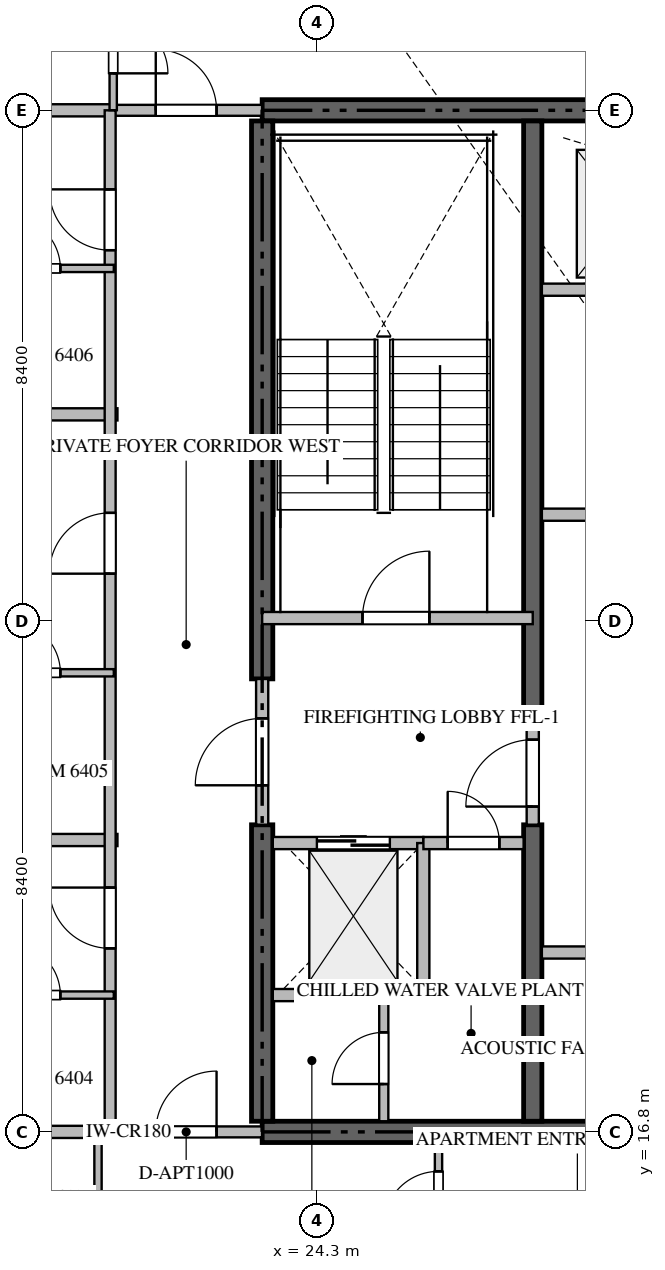
"""IFC4 building model, lengths in metres.
Left out: names, types, materials, properties, quantities, classifications, styles, units other than length and angle.
Written with IfcOpenShell. Run it as: python <this file> out.ifc"""

import sys

from ifc_helpers import new_model, si_unit, direction, frame, frame_2d, origin, place, context, subcontext, project, spatial, rectangle, extrude, source, transform, mapped, element, fill, save


model = new_model("IFC4")
c1 = context("Model", 3, precision=1e-05, world=origin(), true_north=direction((0.0, 1.0)))
c2 = subcontext(c1, "Body", "Model", "MODEL_VIEW")
j1 = project(units=[si_unit("LENGTHUNIT", "METRE"), si_unit("PLANEANGLEUNIT", "RADIAN")], contexts=[c1])
p1 = place(None, origin())
s1 = spatial("IfcSite", under=j1, at=p1, CompositionType="ELEMENT")
p2 = place(p1, origin())
s2 = spatial("IfcBuilding", under=s1, at=p2, CompositionType="ELEMENT")
p3 = place(p2, frame((0.0, 0.0, 256.65)))
s3 = spatial("IfcBuildingStorey", under=s2, at=p3, CompositionType="ELEMENT", Elevation=256.65)
for number, where, z_axis, x_axis in (
    (1, (23.4, 16.8, -0.26), (0.0, 0.0, 1.0), (1.0, 0.0, 0.0)),
    (2, (41.4, 33.6, -0.26), (0.0, 0.0, 1.0), (-1.0, 0.0, 0.0)),
):
    element("IfcWall", number, at=place(p3, frame(where, z_axis=z_axis, x_axis=x_axis)), inside=s3, PredefinedType="SHEAR", context=c2, shape_type="SweptSolid", body=[
        extrude(rectangle(XDim=18.0, YDim=0.35, at=frame_2d((9.0, 0.0))), origin(), (0.0, 0.0, 1.0), 3.848),
    ])
p4 = place(p3, frame((23.4, 16.975, -0.26), z_axis=(0.0, 0.0, 1.0), x_axis=(0.0, 1.0, 0.0)))
e3 = element("IfcWall", 3, at=p4, inside=s3, PredefinedType="SHEAR", context=c2, shape_type="SweptSolid", body=[
    extrude(rectangle(XDim=4.875, YDim=0.35, at=frame_2d((2.438, 0.0))), origin(), (0.0, 0.0, 1.0), 3.848),
])
p5 = place(p3, frame((23.4, 24.25, -0.26), z_axis=(0.0, 0.0, 1.0), x_axis=(0.0, 1.0, 0.0)))
e4 = element("IfcWall", 4, at=p5, inside=s3, PredefinedType="SHEAR", context=c2, shape_type="SweptSolid", body=[
    extrude(rectangle(XDim=9.175, YDim=0.35, at=frame_2d((4.587, 0.0))), origin(), (0.0, 0.0, 1.0), 3.848),
])
p6 = place(p3, frame((27.85, 16.975, -0.26), z_axis=(0.0, 0.0, 1.0), x_axis=(0.0, 1.0, 0.0)))
e5 = element("IfcWall", 5, at=p6, inside=s3, PredefinedType="SHEAR", context=c2, shape_type="SweptSolid", body=[
    extrude(rectangle(XDim=4.875, YDim=0.3, at=frame_2d((2.438, 0.0))), origin(), (0.0, 0.0, 1.0), 3.848),
])
p7 = place(p3, frame((27.85, 23.55, -0.26), z_axis=(0.0, 0.0, 1.0), x_axis=(0.0, 1.0, 0.0)))
e6 = element("IfcWall", 6, at=p7, inside=s3, PredefinedType="SHEAR", context=c2, shape_type="SweptSolid", body=[
    extrude(rectangle(XDim=9.875, YDim=0.3, at=frame_2d((4.938, 0.0))), origin(), (0.0, 0.0, 1.0), 3.848),
])
p8 = place(p3, frame((23.4, 25.25, 0.0), z_axis=(0.0, 0.0, 1.0), x_axis=(1.0, 0.0, 0.0)))
e7 = element("IfcWall", 7, at=p8, inside=s3, PredefinedType="STANDARD", context=c2, shape_type="SweptSolid", body=[
    extrude(rectangle(XDim=4.45, YDim=0.2, at=frame_2d((2.225, 0.0))), origin(), (0.0, 0.0, 1.0), 3.59),
])
p9 = place(p8, frame((1.65, 0.0, 0.0)))
e8 = element("IfcOpeningElement", 8, at=p9, cuts=e7, PredefinedType="OPENING", context=c2, shape_type="SweptSolid", body=[
    extrude(rectangle(XDim=1.1, YDim=2.15, at=frame_2d((0.55, 1.075))), frame((0.0, 0.11, 0.0), z_axis=(0.0, -1.0, 0.0), x_axis=(1.0, 0.0, 0.0)), (0.0, 0.0, 1.0), 0.22),
])
p10 = place(p3, frame((23.575, 21.55, 0.0), z_axis=(0.0, 0.0, 1.0), x_axis=(1.0, 0.0, 0.0)))
e9 = element("IfcWall", 9, at=p10, inside=s3, PredefinedType="STANDARD", context=c2, shape_type="SweptSolid", body=[
    extrude(rectangle(XDim=2.475, YDim=0.2, at=frame_2d((1.238, 0.0))), origin(), (0.0, 0.0, 1.0), 3.59),
])
p11 = place(p10, frame((0.725, 0.0, 0.0)))
e10 = element("IfcOpeningElement", 10, at=p11, cuts=e9, PredefinedType="OPENING", context=c2, shape_type="SweptSolid", body=[
    extrude(rectangle(XDim=1.2, YDim=2.2, at=frame_2d((0.6, 1.1))), frame((0.0, 0.11, 0.0), z_axis=(0.0, -1.0, 0.0), x_axis=(1.0, 0.0, 0.0)), (0.0, 0.0, 1.0), 0.22),
])
p12 = place(p3, frame((28.0, 30.65, 0.0), z_axis=(0.0, 0.0, 1.0), x_axis=(1.0, 0.0, 0.0)))
e11 = element("IfcWall", 11, at=p12, inside=s3, PredefinedType="STANDARD", context=c2, shape_type="SweptSolid", body=[
    extrude(rectangle(XDim=2.55, YDim=0.2, at=frame_2d((1.275, 0.0))), origin(), (0.0, 0.0, 1.0), 3.59),
])
p13 = place(p12, frame((0.85, 0.0, 0.0)))
e12 = element("IfcOpeningElement", 12, at=p13, cuts=e11, PredefinedType="OPENING", context=c2, shape_type="SweptSolid", body=[
    extrude(rectangle(XDim=1.1, YDim=2.2, at=frame_2d((0.55, 1.1))), frame((0.0, 0.11, 0.0), z_axis=(0.0, -1.0, 0.0), x_axis=(1.0, 0.0, 0.0)), (0.0, 0.0, 1.0), 0.22),
])
p14 = place(p3, frame((26.05, 19.05, 0.0), z_axis=(0.0, 0.0, 1.0), x_axis=(0.0, 1.0, 0.0)))
e13 = element("IfcWall", 13, at=p14, inside=s3, PredefinedType="STANDARD", context=c2, shape_type="SweptSolid", body=[
    extrude(rectangle(XDim=2.5, YDim=0.2, at=frame_2d((1.25, 0.0))), origin(), (0.0, 0.0, 1.0), 3.59),
])
p15 = place(p3, frame((23.575, 19.05, 0.0), z_axis=(0.0, 0.0, 1.0), x_axis=(1.0, 0.0, 0.0)))
e14 = element("IfcWall", 14, at=p15, inside=s3, PredefinedType="STANDARD", context=c2, shape_type="SweptSolid", body=[
    extrude(rectangle(XDim=2.475, YDim=0.2, at=frame_2d((1.238, 0.0))), origin(), (0.0, 0.0, 1.0), 3.59),
])
p16 = place(p3, frame((26.052, 21.55, 0.0), z_axis=(0.0, 0.0, 1.0), x_axis=(1.0, 0.0, 0.0)))
e15 = element("IfcWall", 15, at=p16, inside=s3, PredefinedType="STANDARD", context=c2, shape_type="SweptSolid", body=[
    extrude(rectangle(XDim=1.648, YDim=0.2, at=frame_2d((0.824, 0.0))), origin(), (0.0, 0.0, 1.0), 3.59),
])
p17 = place(p16, frame((0.399, 0.0, 0.0)))
e16 = element("IfcOpeningElement", 16, at=p17, cuts=e15, PredefinedType="OPENING", context=c2, shape_type="SweptSolid", body=[
    extrude(rectangle(XDim=0.85, YDim=2.1, at=frame_2d((0.425, 1.05))), frame((0.0, 0.11, 0.0), z_axis=(0.0, -1.0, 0.0), x_axis=(1.0, 0.0, 0.0)), (0.0, 0.0, 1.0), 0.22),
])
p18 = place(p3, frame((23.4, 21.852, 0.0), z_axis=(0.0, 0.0, 1.0), x_axis=(0.0, 1.0, 0.0)))
e17 = element("IfcWall", 17, at=p18, inside=s3, PredefinedType="STANDARD", context=c2, shape_type="SweptSolid", body=[
    extrude(rectangle(XDim=2.396, YDim=0.2, at=frame_2d((1.198, 0.0))), origin(), (0.0, 0.0, 1.0), 3.59),
])
p19 = place(p18, frame((0.648, 0.0, 0.0)))
e18 = element("IfcOpeningElement", 18, at=p19, cuts=e17, PredefinedType="OPENING", context=c2, shape_type="SweptSolid", body=[
    extrude(rectangle(XDim=1.1, YDim=2.15, at=frame_2d((0.55, 1.075))), frame((0.0, 0.11, 0.0), z_axis=(0.0, -1.0, 0.0), x_axis=(1.0, 0.0, 0.0)), (0.0, 0.0, 1.0), 0.22),
])
p20 = place(p3, frame((27.85, 21.852, 0.0), z_axis=(0.0, 0.0, 1.0), x_axis=(0.0, 1.0, 0.0)))
e19 = element("IfcWall", 19, at=p20, inside=s3, PredefinedType="STANDARD", context=c2, shape_type="SweptSolid", body=[
    extrude(rectangle(XDim=1.696, YDim=0.2, at=frame_2d((0.848, 0.0))), origin(), (0.0, 0.0, 1.0), 3.59),
])
p21 = place(p20, frame((0.298, 0.0, 0.0)))
e20 = element("IfcOpeningElement", 20, at=p21, cuts=e19, PredefinedType="OPENING", context=c2, shape_type="SweptSolid", body=[
    extrude(rectangle(XDim=1.1, YDim=2.15, at=frame_2d((0.55, 1.075))), frame((0.0, 0.11, 0.0), z_axis=(0.0, -1.0, 0.0), x_axis=(1.0, 0.0, 0.0)), (0.0, 0.0, 1.0), 0.22),
])
p22 = place(p3, frame((25.4, 16.975, 0.0), z_axis=(0.0, 0.0, 1.0), x_axis=(0.0, 1.0, 0.0)))
e21 = element("IfcWall", 21, at=p22, inside=s3, PredefinedType="PARTITIONING", context=c2, shape_type="SweptSolid", body=[
    extrude(rectangle(XDim=2.075, YDim=0.15, at=frame_2d((1.038, 0.0))), origin(), (0.0, 0.0, 1.0), 3.59),
])
p23 = place(p22, frame((0.612, 0.0, 0.0)))
e22 = element("IfcOpeningElement", 22, at=p23, cuts=e21, PredefinedType="OPENING", context=c2, shape_type="SweptSolid", body=[
    extrude(rectangle(XDim=0.85, YDim=2.1, at=frame_2d((0.425, 1.05))), frame((0.0, 0.085, 0.0), z_axis=(0.0, -1.0, 0.0), x_axis=(1.0, 0.0, 0.0)), (0.0, 0.0, 1.0), 0.17),
])
p24 = place(p3, frame((28.0, 19.75, 0.0), z_axis=(0.0, 0.0, 1.0), x_axis=(1.0, 0.0, 0.0)))
e23 = element("IfcWall", 23, at=p24, inside=s3, PredefinedType="STANDARD", context=c2, shape_type="SweptSolid", body=[
    extrude(rectangle(XDim=4.4, YDim=0.2, at=frame_2d((2.2, 0.0))), origin(), (0.0, 0.0, 1.0), 3.59),
])
p25 = place(p24, frame((1.75, 0.0, 0.0)))
e24 = element("IfcOpeningElement", 24, at=p25, cuts=e23, PredefinedType="OPENING", context=c2, shape_type="SweptSolid", body=[
    extrude(rectangle(XDim=0.9, YDim=2.1, at=frame_2d((0.45, 1.05))), frame((0.0, 0.11, 0.0), z_axis=(0.0, -1.0, 0.0), x_axis=(1.0, 0.0, 0.0)), (0.0, 0.0, 1.0), 0.22),
])
p26 = place(p3, frame((28.0, 26.95, 0.0), z_axis=(0.0, 0.0, 1.0), x_axis=(1.0, 0.0, 0.0)))
e25 = element("IfcWall", 25, at=p26, inside=s3, PredefinedType="STANDARD", context=c2, shape_type="SweptSolid", body=[
    extrude(rectangle(XDim=6.95, YDim=0.2, at=frame_2d((3.475, 0.0))), origin(), (0.0, 0.0, 1.0), 3.59),
])
for number, where, z_axis, x_axis in (
    (26, (7.482, 21.6, 0.0), (0.0, 0.0, 1.0), (1.0, 0.0, 0.0)),
    (27, (7.482, 28.6, 0.0), (0.0, 0.0, 1.0), (1.0, 0.0, 0.0)),
):
    element("IfcWall", number, at=place(p3, frame(where, z_axis=z_axis, x_axis=x_axis)), inside=s3, PredefinedType="PARTITIONING", context=c2, shape_type="SweptSolid", body=[
        extrude(rectangle(XDim=13.538, YDim=0.2, at=frame_2d((6.769, 0.0))), origin(), (0.0, 0.0, 1.0), 3.59),
    ])
for number, where, z_axis, x_axis in (
    (28, (7.482, 16.8, 0.0), (0.0, 0.0, 1.0), (1.0, 0.0, 0.0)),
    (29, (7.482, 33.6, 0.0), (0.0, 0.0, 1.0), (1.0, 0.0, 0.0)),
):
    element("IfcWall", number, at=place(p3, frame(where, z_axis=z_axis, x_axis=x_axis)), inside=s3, PredefinedType="PARTITIONING", context=c2, shape_type="SweptSolid", body=[
        extrude(rectangle(XDim=13.418, YDim=0.2, at=frame_2d((6.709, 0.0))), origin(), (0.0, 0.0, 1.0), 3.59),
    ])
p27 = place(p3, frame((20.902, 16.8, 0.0), z_axis=(0.0, 0.0, 1.0), x_axis=(1.0, 0.0, 0.0)))
e30 = element("IfcWall", 30, at=p27, inside=s3, PredefinedType="PARTITIONING", context=c2, shape_type="SweptSolid", body=[
    extrude(rectangle(XDim=2.496, YDim=0.18, at=frame_2d((1.248, 0.0))), origin(), (0.0, 0.0, 1.0), 3.59),
])
p28 = place(p27, frame((0.748, 0.0, 0.0)))
e31 = element("IfcOpeningElement", 31, at=p28, cuts=e30, PredefinedType="OPENING", context=c2, shape_type="SweptSolid", body=[
    extrude(rectangle(XDim=1.0, YDim=2.15, at=frame_2d((0.5, 1.075))), frame((0.0, 0.1, 0.0), z_axis=(0.0, -1.0, 0.0), x_axis=(1.0, 0.0, 0.0)), (0.0, 0.0, 1.0), 0.2),
])
p29 = place(p3, frame((20.902, 33.6, 0.0), z_axis=(0.0, 0.0, 1.0), x_axis=(1.0, 0.0, 0.0)))
e32 = element("IfcWall", 32, at=p29, inside=s3, PredefinedType="PARTITIONING", context=c2, shape_type="SweptSolid", body=[
    extrude(rectangle(XDim=2.496, YDim=0.18, at=frame_2d((1.248, 0.0))), origin(), (0.0, 0.0, 1.0), 3.59),
])
p30 = place(p29, frame((0.748, 0.0, 0.0)))
e33 = element("IfcOpeningElement", 33, at=p30, cuts=e32, PredefinedType="OPENING", context=c2, shape_type="SweptSolid", body=[
    extrude(rectangle(XDim=1.0, YDim=2.15, at=frame_2d((0.5, 1.075))), frame((0.0, 0.1, 0.0), z_axis=(0.0, -1.0, 0.0), x_axis=(1.0, 0.0, 0.0)), (0.0, 0.0, 1.0), 0.2),
])
p31 = place(p3, frame((20.9, 16.8, 0.0), z_axis=(0.0, 0.0, 1.0), x_axis=(0.0, 1.0, 0.0)))
e34 = element("IfcWall", 34, at=p31, inside=s3, PredefinedType="PARTITIONING", context=c2, shape_type="SweptSolid", body=[
    extrude(rectangle(XDim=16.8, YDim=0.18, at=frame_2d((8.4, 0.0))), origin(), (0.0, 0.0, 1.0), 3.59),
])
p32 = place(p31, frame((3.018, 0.0, 0.0)))
e35 = element("IfcOpeningElement", 35, at=p32, cuts=e34, PredefinedType="OPENING", context=c2, shape_type="SweptSolid", body=[
    extrude(rectangle(XDim=1.0, YDim=2.15, at=frame_2d((0.5, 1.075))), frame((0.0, 0.1, 0.0), z_axis=(0.0, -1.0, 0.0), x_axis=(1.0, 0.0, 0.0)), (0.0, 0.0, 1.0), 0.2),
])
p33 = place(p31, frame((9.18, 0.0, 0.0)))
e36 = element("IfcOpeningElement", 36, at=p33, cuts=e34, PredefinedType="OPENING", context=c2, shape_type="SweptSolid", body=[
    extrude(rectangle(XDim=1.0, YDim=2.15, at=frame_2d((0.5, 1.075))), frame((0.0, 0.1, 0.0), z_axis=(0.0, -1.0, 0.0), x_axis=(1.0, 0.0, 0.0)), (0.0, 0.0, 1.0), 0.2),
])
p34 = place(p31, frame((14.5, 0.0, 0.0)))
e37 = element("IfcOpeningElement", 37, at=p34, cuts=e34, PredefinedType="OPENING", context=c2, shape_type="SweptSolid", body=[
    extrude(rectangle(XDim=1.0, YDim=2.15, at=frame_2d((0.5, 1.075))), frame((0.0, 0.1, 0.0), z_axis=(0.0, -1.0, 0.0), x_axis=(1.0, 0.0, 0.0)), (0.0, 0.0, 1.0), 0.2),
])
p35 = place(p3, frame((20.7, 14.05, 0.0), z_axis=(0.0, 0.0, 1.0), x_axis=(0.0, 1.0, 0.0)))
e38 = element("IfcWall", 38, at=p35, inside=s3, PredefinedType="PARTITIONING", context=c2, shape_type="SweptSolid", body=[
    extrude(rectangle(XDim=2.81, YDim=0.12, at=frame_2d((1.405, 0.0))), origin(), (0.0, 0.0, 1.0), 3.59),
])
p36 = place(p3, frame((26.3, 14.65, 0.0), z_axis=(0.0, 0.0, 1.0), x_axis=(0.0, 1.0, 0.0)))
e39 = element("IfcWall", 39, at=p36, inside=s3, PredefinedType="PARTITIONING", context=c2, shape_type="SweptSolid", body=[
    extrude(rectangle(XDim=1.975, YDim=0.12, at=frame_2d((0.988, 0.0))), origin(), (0.0, 0.0, 1.0), 3.59),
])
p37 = place(p36, frame((0.601, 0.0, 0.0)))
e40 = element("IfcOpeningElement", 40, at=p37, cuts=e39, PredefinedType="OPENING", context=c2, shape_type="SweptSolid", body=[
    extrude(rectangle(XDim=0.9, YDim=2.1, at=frame_2d((0.45, 1.05))), frame((0.0, 0.07, 0.0), z_axis=(0.0, -1.0, 0.0), x_axis=(1.0, 0.0, 0.0)), (0.0, 0.0, 1.0), 0.14),
])
p38 = place(p3, frame((20.95, 35.75, 0.0), z_axis=(0.0, 0.0, 1.0), x_axis=(0.0, -1.0, 0.0)))
e41 = element("IfcWall", 41, at=p38, inside=s3, PredefinedType="PARTITIONING", context=c2, shape_type="SweptSolid", body=[
    extrude(rectangle(XDim=2.148, YDim=0.12, at=frame_2d((1.074, 0.0))), origin(), (0.0, 0.0, 1.0), 3.59),
])
p39 = place(p38, frame((0.642, 0.0, 0.0)))
e42 = element("IfcOpeningElement", 42, at=p39, cuts=e41, PredefinedType="OPENING", context=c2, shape_type="SweptSolid", body=[
    extrude(rectangle(XDim=0.9, YDim=2.1, at=frame_2d((0.45, 1.05))), frame((0.0, 0.07, 0.0), z_axis=(0.0, -1.0, 0.0), x_axis=(1.0, 0.0, 0.0)), (0.0, 0.0, 1.0), 0.14),
])
p40 = place(p3, frame((18.352, 19.05, 0.0), z_axis=(0.0, 0.0, 1.0), x_axis=(1.0, 0.0, 0.0)))
e43 = element("IfcWall", 43, at=p40, inside=s3, PredefinedType="PARTITIONING", context=c2, shape_type="SweptSolid", body=[
    extrude(rectangle(XDim=2.608, YDim=0.12, at=frame_2d((1.304, 0.0))), origin(), (0.0, 0.0, 1.0), 3.59),
])
p41 = place(p40, frame((0.879, 0.0, 0.0)))
e44 = element("IfcOpeningElement", 44, at=p41, cuts=e43, PredefinedType="OPENING", context=c2, shape_type="SweptSolid", body=[
    extrude(rectangle(XDim=0.85, YDim=2.1, at=frame_2d((0.425, 1.05))), frame((0.0, 0.07, 0.0), z_axis=(0.0, -1.0, 0.0), x_axis=(1.0, 0.0, 0.0)), (0.0, 0.0, 1.0), 0.14),
])
p42 = place(p3, frame((18.352, 24.35, 0.0), z_axis=(0.0, 0.0, 1.0), x_axis=(1.0, 0.0, 0.0)))
e45 = element("IfcWall", 45, at=p42, inside=s3, PredefinedType="PARTITIONING", context=c2, shape_type="SweptSolid", body=[
    extrude(rectangle(XDim=2.608, YDim=0.12, at=frame_2d((1.304, 0.0))), origin(), (0.0, 0.0, 1.0), 3.59),
])
p43 = place(p42, frame((0.879, 0.0, 0.0)))
e46 = element("IfcOpeningElement", 46, at=p43, cuts=e45, PredefinedType="OPENING", context=c2, shape_type="SweptSolid", body=[
    extrude(rectangle(XDim=0.85, YDim=2.1, at=frame_2d((0.425, 1.05))), frame((0.0, 0.07, 0.0), z_axis=(0.0, -1.0, 0.0), x_axis=(1.0, 0.0, 0.0)), (0.0, 0.0, 1.0), 0.14),
])
p44 = place(p3, frame((18.352, 31.0, 0.0), z_axis=(0.0, 0.0, 1.0), x_axis=(1.0, 0.0, 0.0)))
e47 = element("IfcWall", 47, at=p44, inside=s3, PredefinedType="PARTITIONING", context=c2, shape_type="SweptSolid", body=[
    extrude(rectangle(XDim=2.608, YDim=0.12, at=frame_2d((1.304, 0.0))), origin(), (0.0, 0.0, 1.0), 3.59),
])
p45 = place(p44, frame((0.879, 0.0, 0.0)))
e48 = element("IfcOpeningElement", 48, at=p45, cuts=e47, PredefinedType="OPENING", context=c2, shape_type="SweptSolid", body=[
    extrude(rectangle(XDim=0.85, YDim=2.1, at=frame_2d((0.425, 1.05))), frame((0.0, 0.07, 0.0), z_axis=(0.0, -1.0, 0.0), x_axis=(1.0, 0.0, 0.0)), (0.0, 0.0, 1.0), 0.14),
])
m1 = source(origin(), c2, "Body", "SweptSolid", [
    extrude(rectangle(XDim=1.1, YDim=2.15, at=frame_2d((0.55, 1.075))), frame((0.0, 0.025, 0.0), z_axis=(0.0, -1.0, 0.0), x_axis=(1.0, 0.0, 0.0)), (0.0, 0.0, 1.0), 0.05),
])
p46 = place(p9, origin())
e49 = element("IfcDoor", 49, at=p46, inside=s3, OperationType="SINGLE_SWING_RIGHT", PredefinedType="DOOR", context=c2, shape_type="MappedRepresentation", body=[
    mapped(m1, transform((0.0, 0.0, 0.0), scale=1.0)),
])
fill(e8, e49)
m2 = source(origin(), c2, "Body", "SweptSolid", [
    extrude(rectangle(XDim=1.2, YDim=2.2, at=frame_2d((0.6, 1.1))), frame((0.0, 0.025, 0.0), z_axis=(0.0, -1.0, 0.0), x_axis=(1.0, 0.0, 0.0)), (0.0, 0.0, 1.0), 0.05),
])
p47 = place(p11, origin())
e50 = element("IfcDoor", 50, at=p47, inside=s3, OperationType="DOUBLE_DOOR_SLIDING", PredefinedType="DOOR", context=c2, shape_type="MappedRepresentation", body=[
    mapped(m2, transform((0.0, 0.0, 0.0), scale=1.0)),
])
fill(e10, e50)
m3 = source(origin(), c2, "Body", "SweptSolid", [
    extrude(rectangle(XDim=0.85, YDim=2.1, at=frame_2d((0.425, 1.05))), frame((0.0, 0.025, 0.0), z_axis=(0.0, -1.0, 0.0), x_axis=(1.0, 0.0, 0.0)), (0.0, 0.0, 1.0), 0.05),
])
p48 = place(p17, origin())
e51 = element("IfcDoor", 51, at=p48, inside=s3, OperationType="SINGLE_SWING_LEFT", PredefinedType="DOOR", context=c2, shape_type="MappedRepresentation", body=[
    mapped(m3, transform((0.0, 0.0, 0.0), scale=1.0)),
])
fill(e16, e51)
p49 = place(p19, origin())
e52 = element("IfcDoor", 52, at=p49, inside=s3, OperationType="SINGLE_SWING_LEFT", PredefinedType="DOOR", context=c2, shape_type="MappedRepresentation", body=[
    mapped(m1, transform((0.0, 0.0, 0.0), scale=1.0)),
])
fill(e18, e52)
p50 = place(p21, origin())
e53 = element("IfcDoor", 53, at=p50, inside=s3, OperationType="SINGLE_SWING_LEFT", PredefinedType="DOOR", context=c2, shape_type="MappedRepresentation", body=[
    mapped(m1, transform((0.0, 0.0, 0.0), scale=1.0)),
])
fill(e20, e53)
p51 = place(p23, origin())
e54 = element("IfcDoor", 54, at=p51, inside=s3, OperationType="SINGLE_SWING_LEFT", PredefinedType="DOOR", context=c2, shape_type="MappedRepresentation", body=[
    mapped(m3, transform((0.0, 0.0, 0.0), scale=1.0)),
])
fill(e22, e54)
m4 = source(origin(), c2, "Body", "SweptSolid", [
    extrude(rectangle(XDim=1.0, YDim=2.15, at=frame_2d((0.5, 1.075))), frame((0.0, 0.025, 0.0), z_axis=(0.0, -1.0, 0.0), x_axis=(1.0, 0.0, 0.0)), (0.0, 0.0, 1.0), 0.05),
])
p52 = place(p28, origin())
e55 = element("IfcDoor", 55, at=p52, inside=s3, OperationType="SINGLE_SWING_RIGHT", PredefinedType="DOOR", context=c2, shape_type="MappedRepresentation", body=[
    mapped(m4, transform((0.0, 0.0, 0.0), scale=1.0)),
])
fill(e31, e55)
p53 = place(p30, origin())
e56 = element("IfcDoor", 56, at=p53, inside=s3, OperationType="SINGLE_SWING_LEFT", PredefinedType="DOOR", context=c2, shape_type="MappedRepresentation", body=[
    mapped(m4, transform((0.0, 0.0, 0.0), scale=1.0)),
])
fill(e33, e56)
p54 = place(p32, origin())
e57 = element("IfcDoor", 57, at=p54, inside=s3, OperationType="SINGLE_SWING_RIGHT", PredefinedType="DOOR", context=c2, shape_type="MappedRepresentation", body=[
    mapped(m4, transform((0.0, 0.0, 0.0), scale=1.0)),
])
fill(e35, e57)
p55 = place(p33, origin())
e58 = element("IfcDoor", 58, at=p55, inside=s3, OperationType="SINGLE_SWING_LEFT", PredefinedType="DOOR", context=c2, shape_type="MappedRepresentation", body=[
    mapped(m4, transform((0.0, 0.0, 0.0), scale=1.0)),
])
fill(e36, e58)
p56 = place(p34, origin())
e59 = element("IfcDoor", 59, at=p56, inside=s3, OperationType="SINGLE_SWING_RIGHT", PredefinedType="DOOR", context=c2, shape_type="MappedRepresentation", body=[
    mapped(m4, transform((0.0, 0.0, 0.0), scale=1.0)),
])
fill(e37, e59)
m5 = source(origin(), c2, "Body", "SweptSolid", [
    extrude(rectangle(XDim=0.9, YDim=2.1, at=frame_2d((0.45, 1.05))), frame((0.0, 0.025, 0.0), z_axis=(0.0, -1.0, 0.0), x_axis=(1.0, 0.0, 0.0)), (0.0, 0.0, 1.0), 0.05),
])
p57 = place(p37, origin())
e60 = element("IfcDoor", 60, at=p57, inside=s3, OperationType="SINGLE_SWING_LEFT", PredefinedType="DOOR", context=c2, shape_type="MappedRepresentation", body=[
    mapped(m5, transform((0.0, 0.0, 0.0), scale=1.0)),
])
fill(e40, e60)
p58 = place(p39, origin())
e61 = element("IfcDoor", 61, at=p58, inside=s3, OperationType="SINGLE_SWING_RIGHT", PredefinedType="DOOR", context=c2, shape_type="MappedRepresentation", body=[
    mapped(m5, transform((0.0, 0.0, 0.0), scale=1.0)),
])
fill(e42, e61)
p59 = place(p41, origin())
e62 = element("IfcDoor", 62, at=p59, inside=s3, OperationType="SINGLE_SWING_LEFT", PredefinedType="DOOR", context=c2, shape_type="MappedRepresentation", body=[
    mapped(m3, transform((0.0, 0.0, 0.0), scale=1.0)),
])
fill(e44, e62)
p60 = place(p43, origin())
e63 = element("IfcDoor", 63, at=p60, inside=s3, OperationType="SINGLE_SWING_LEFT", PredefinedType="DOOR", context=c2, shape_type="MappedRepresentation", body=[
    mapped(m3, transform((0.0, 0.0, 0.0), scale=1.0)),
])
fill(e46, e63)
p61 = place(p45, origin())
e64 = element("IfcDoor", 64, at=p61, inside=s3, OperationType="SINGLE_SWING_LEFT", PredefinedType="DOOR", context=c2, shape_type="MappedRepresentation", body=[
    mapped(m3, transform((0.0, 0.0, 0.0), scale=1.0)),
])
fill(e48, e64)
save(model, sys.argv[1])
